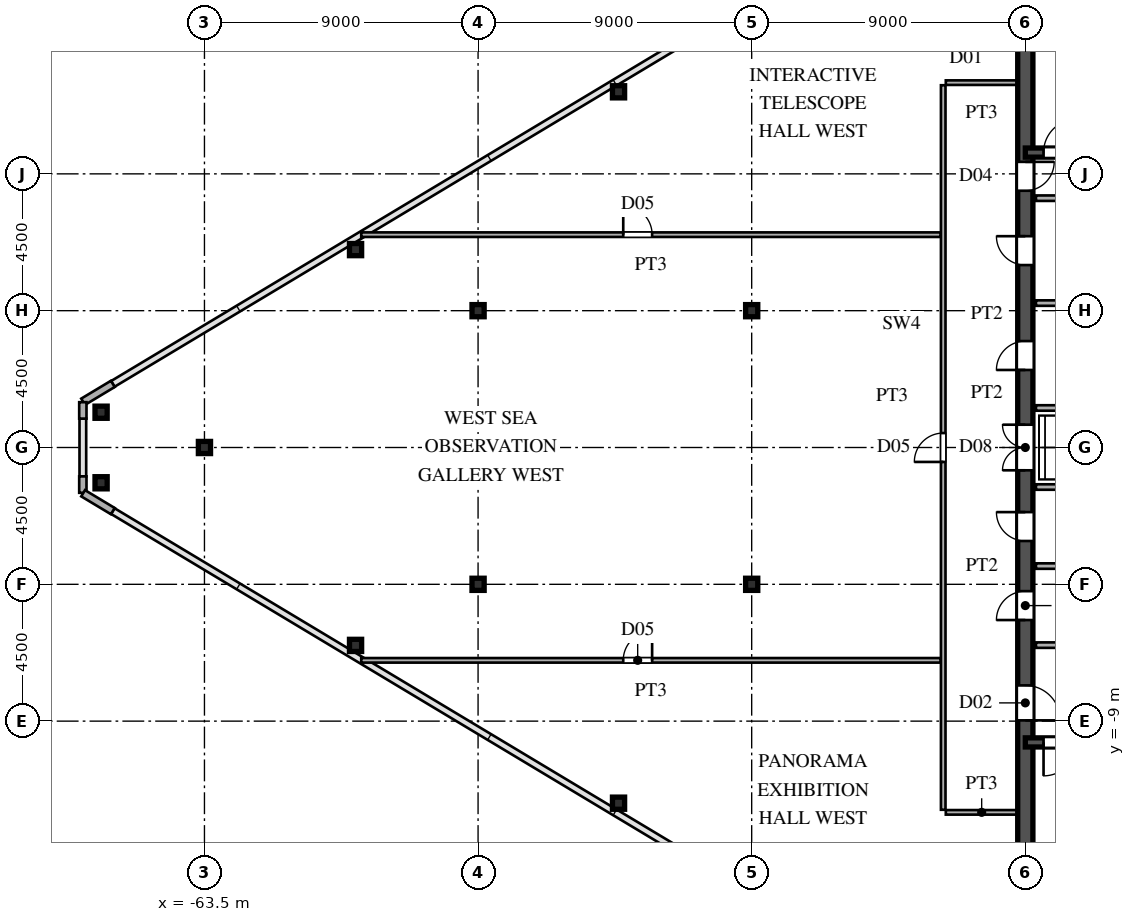
"""IFC4 building model, lengths in metres.
Left out: names, types, materials, properties, quantities, classifications, styles, units other than length and angle.
Written with IfcOpenShell. Run it as: python <this file> out.ifc"""

import sys

from ifc_helpers import new_model, si_unit, direction, frame, frame_2d, origin, origin_2d, place, context, subcontext, project, spatial, rectangle, hollow_rectangle, i_section, extrude, source, transform, mapped, element, fill, save


model = new_model("IFC4")
c1 = context("Model", 3, precision=1e-05, world=origin(), true_north=direction((0.0, 1.0)))
c2 = subcontext(c1, "Body", "Model", "MODEL_VIEW")
j1 = project(units=[si_unit("LENGTHUNIT", "METRE"), si_unit("PLANEANGLEUNIT", "RADIAN")], contexts=[c1])
p1 = place(None, origin())
s1 = spatial("IfcSite", under=j1, at=p1, CompositionType="ELEMENT")
p2 = place(p1, origin())
s2 = spatial("IfcBuilding", under=s1, at=p2, CompositionType="ELEMENT")
p3 = place(p2, frame((0.0, 0.0, 269.4)))
s3 = spatial("IfcBuildingStorey", under=s2, at=p3, CompositionType="ELEMENT", Elevation=269.4)
m1 = source(origin(), c2, "Body", "SweptSolid", [
    extrude(i_section(OverallWidth=0.4, OverallDepth=0.4, WebThickness=0.013, FlangeThickness=0.021, at=origin_2d()), origin(), (0.0, 0.0, 1.0), 4.8),
])
for number, where, z_axis, x_axis in (
    (1, (-45.5, -4.5, 0.0), (0.0, 0.0, 1.0), (1.0, 0.0, 0.0)),
    (2, (-45.5, 4.5, 0.0), (0.0, 0.0, 1.0), (1.0, 0.0, 0.0)),
    (3, (-54.5, -4.5, 0.0), (0.0, 0.0, 1.0), (1.0, 0.0, 0.0)),
    (4, (-54.5, 4.5, 0.0), (0.0, 0.0, 1.0), (1.0, 0.0, 0.0)),
    (5, (-63.5, 0.0, 0.0), (0.0, 0.0, 1.0), (1.0, 0.0, 0.0)),
):
    element("IfcColumn", number, at=place(p3, frame(where, z_axis=z_axis, x_axis=x_axis)), inside=s3, PredefinedType="COLUMN", context=c2, shape_type="MappedRepresentation", body=[
        mapped(m1, transform((0.0, 0.0, 0.0), scale=1.0)),
    ])
m2 = source(origin(), c2, "Body", "SweptSolid", [
    extrude(hollow_rectangle(XDim=0.4, YDim=0.4, WallThickness=0.016, at=origin_2d()), origin(), (0.0, 0.0, 1.0), 4.8),
])
for number, where, z_axis, x_axis in (
    (6, (-66.9, 1.16, 0.0), (0.0, 0.0, 1.0), (1.0, 0.0, 0.0)),
    (7, (-66.9, -1.16, 0.0), (0.0, 0.0, 1.0), (1.0, 0.0, 0.0)),
    (8, (-49.88, -11.699, 0.0), (0.0, 0.0, 1.0), (1.0, 0.0, 0.0)),
    (9, (-58.53, -6.509, 0.0), (0.0, 0.0, 1.0), (1.0, 0.0, 0.0)),
    (10, (-49.88, 11.699, 0.0), (0.0, 0.0, 1.0), (1.0, 0.0, 0.0)),
    (11, (-58.53, 6.509, 0.0), (0.0, 0.0, 1.0), (1.0, 0.0, 0.0)),
):
    element("IfcColumn", number, at=place(p3, frame(where, z_axis=z_axis, x_axis=x_axis)), inside=s3, PredefinedType="COLUMN", context=c2, shape_type="MappedRepresentation", body=[
        mapped(m2, transform((0.0, 0.0, 0.0), scale=1.0)),
    ])
p4 = place(p3, frame((-66.514, 2.092, 0.0), z_axis=(0.0, 0.0, 1.0), x_axis=(-0.85743623509, -0.514590228002, 0.0)))
e12 = element("IfcWall", 12, at=p4, inside=s3, PredefinedType="SOLIDWALL", context=c2, shape_type="SweptSolid", body=[
    extrude(rectangle(XDim=1.14, YDim=0.24, at=frame_2d((0.57, 0.0))), origin(), (0.0, 0.0, 1.0), 4.54),
])
for number, where, z_axis, x_axis in (
    (13, (-67.5, 1.49, 0.0), (0.0, 0.0, 1.0), (0.0, -1.0, 0.0)),
    (14, (-67.5, -0.95, 0.0), (0.0, 0.0, 1.0), (0.0, -1.0, 0.0)),
):
    element("IfcWall", number, at=place(p3, frame(where, z_axis=z_axis, x_axis=x_axis)), inside=s3, PredefinedType="SOLIDWALL", context=c2, shape_type="SweptSolid", body=[
        extrude(rectangle(XDim=0.54, YDim=0.24, at=frame_2d((0.27, 0.0))), origin(), (0.0, 0.0, 1.0), 4.54),
    ])
p5 = place(p3, frame((-67.491, -1.505, 0.0), z_axis=(0.0, 0.0, 1.0), x_axis=(0.85743623509, -0.514590228002, 0.0)))
e15 = element("IfcWall", 15, at=p5, inside=s3, PredefinedType="SOLIDWALL", context=c2, shape_type="SweptSolid", body=[
    extrude(rectangle(XDim=1.14, YDim=0.24, at=frame_2d((0.57, 0.0))), origin(), (0.0, 0.0, 1.0), 4.54),
])
p6 = place(p3, frame((-36.5, -13.65, 0.0), z_axis=(0.0, 0.0, 1.0), x_axis=(0.0, 1.0, 0.0)))
e16 = element("IfcWall", 16, at=p6, inside=s3, PredefinedType="SHEAR", context=c2, shape_type="SweptSolid", body=[
    extrude(rectangle(XDim=7.15, YDim=0.5, at=frame_2d((3.575, 0.0))), origin(), (0.0, 0.0, 1.0), 4.54),
])
p7 = place(p6, frame((4.675, 0.0, 0.0)))
e17 = element("IfcOpeningElement", 17, at=p7, cuts=e16, PredefinedType="OPENING", context=c2, shape_type="SweptSolid", body=[
    extrude(rectangle(XDim=1.15, YDim=2.2, at=frame_2d((0.575, 1.1))), frame((0.0, 0.26, 0.0), z_axis=(0.0, -1.0, 0.0), x_axis=(1.0, 0.0, 0.0)), (0.0, 0.0, 1.0), 0.52),
])
p8 = place(p3, frame((-36.5, -1.3, 0.0), z_axis=(0.0, 0.0, 1.0), x_axis=(0.0, 1.0, 0.0)))
e18 = element("IfcWall", 18, at=p8, inside=s3, PredefinedType="SHEAR", context=c2, shape_type="SweptSolid", body=[
    extrude(rectangle(XDim=2.6, YDim=0.5, at=frame_2d((1.3, 0.0))), origin(), (0.0, 0.0, 1.0), 4.54),
])
p9 = place(p8, frame((0.55, 0.0, 0.0)))
e19 = element("IfcOpeningElement", 19, at=p9, cuts=e18, PredefinedType="OPENING", context=c2, shape_type="SweptSolid", body=[
    extrude(rectangle(XDim=1.5, YDim=2.3, at=frame_2d((0.75, 1.15))), frame((0.0, 0.26, 0.0), z_axis=(0.0, -1.0, 0.0), x_axis=(1.0, 0.0, 0.0)), (0.0, 0.0, 1.0), 0.52),
])
p10 = place(p3, frame((-36.5, 8.2, 0.0), z_axis=(0.0, 0.0, 1.0), x_axis=(0.0, 1.0, 0.0)))
e20 = element("IfcWall", 20, at=p10, inside=s3, PredefinedType="SHEAR", context=c2, shape_type="SweptSolid", body=[
    extrude(rectangle(XDim=5.45, YDim=0.5, at=frame_2d((2.725, 0.0))), origin(), (0.0, 0.0, 1.0), 4.54),
])
p11 = place(p10, frame((0.245, 0.0, 0.0)))
e21 = element("IfcOpeningElement", 21, at=p11, cuts=e20, PredefinedType="OPENING", context=c2, shape_type="SweptSolid", body=[
    extrude(rectangle(XDim=0.95, YDim=2.15, at=frame_2d((0.475, 1.075))), frame((0.0, 0.26, 0.0), z_axis=(0.0, -1.0, 0.0), x_axis=(1.0, 0.0, 0.0)), (0.0, 0.0, 1.0), 0.52),
])
p12 = place(p3, frame((-36.5, -6.5, 0.0), z_axis=(0.0, 0.0, 1.0), x_axis=(0.0, 1.0, 0.0)))
e22 = element("IfcWall", 22, at=p12, inside=s3, PredefinedType="SHEAR", context=c2, shape_type="SweptSolid", body=[
    extrude(rectangle(XDim=2.6, YDim=0.5, at=frame_2d((1.3, 0.0))), origin(), (0.0, 0.0, 1.0), 4.54),
])
p13 = place(p12, frame((0.825, 0.0, 0.0)))
e23 = element("IfcOpeningElement", 23, at=p13, cuts=e22, PredefinedType="OPENING", context=c2, shape_type="SweptSolid", body=[
    extrude(rectangle(XDim=0.95, YDim=2.15, at=frame_2d((0.475, 1.075))), frame((0.0, 0.26, 0.0), z_axis=(0.0, -1.0, 0.0), x_axis=(1.0, 0.0, 0.0)), (0.0, 0.0, 1.0), 0.52),
])
p14 = place(p3, frame((-36.5, -3.9, 0.0), z_axis=(0.0, 0.0, 1.0), x_axis=(0.0, 1.0, 0.0)))
e24 = element("IfcWall", 24, at=p14, inside=s3, PredefinedType="SHEAR", context=c2, shape_type="SweptSolid", body=[
    extrude(rectangle(XDim=2.6, YDim=0.5, at=frame_2d((1.3, 0.0))), origin(), (0.0, 0.0, 1.0), 4.54),
])
p15 = place(p14, frame((0.825, 0.0, 0.0)))
e25 = element("IfcOpeningElement", 25, at=p15, cuts=e24, PredefinedType="OPENING", context=c2, shape_type="SweptSolid", body=[
    extrude(rectangle(XDim=0.95, YDim=2.15, at=frame_2d((0.475, 1.075))), frame((0.0, 0.26, 0.0), z_axis=(0.0, -1.0, 0.0), x_axis=(1.0, 0.0, 0.0)), (0.0, 0.0, 1.0), 0.52),
])
p16 = place(p3, frame((-36.5, 1.3, 0.0), z_axis=(0.0, 0.0, 1.0), x_axis=(0.0, 1.0, 0.0)))
e26 = element("IfcWall", 26, at=p16, inside=s3, PredefinedType="SHEAR", context=c2, shape_type="SweptSolid", body=[
    extrude(rectangle(XDim=3.45, YDim=0.5, at=frame_2d((1.725, 0.0))), origin(), (0.0, 0.0, 1.0), 4.54),
])
p17 = place(p16, frame((1.25, 0.0, 0.0)))
e27 = element("IfcOpeningElement", 27, at=p17, cuts=e26, PredefinedType="OPENING", context=c2, shape_type="SweptSolid", body=[
    extrude(rectangle(XDim=0.95, YDim=2.15, at=frame_2d((0.475, 1.075))), frame((0.0, 0.26, 0.0), z_axis=(0.0, -1.0, 0.0), x_axis=(1.0, 0.0, 0.0)), (0.0, 0.0, 1.0), 0.52),
])
p18 = place(p3, frame((-36.5, 4.75, 0.0), z_axis=(0.0, 0.0, 1.0), x_axis=(0.0, 1.0, 0.0)))
e28 = element("IfcWall", 28, at=p18, inside=s3, PredefinedType="SHEAR", context=c2, shape_type="SweptSolid", body=[
    extrude(rectangle(XDim=3.45, YDim=0.5, at=frame_2d((1.725, 0.0))), origin(), (0.0, 0.0, 1.0), 4.54),
])
p19 = place(p18, frame((1.25, 0.0, 0.0)))
e29 = element("IfcOpeningElement", 29, at=p19, cuts=e28, PredefinedType="OPENING", context=c2, shape_type="SweptSolid", body=[
    extrude(rectangle(XDim=0.95, YDim=2.15, at=frame_2d((0.475, 1.075))), frame((0.0, 0.26, 0.0), z_axis=(0.0, -1.0, 0.0), x_axis=(1.0, 0.0, 0.0)), (0.0, 0.0, 1.0), 0.52),
])
p20 = place(p3, frame((-36.5, -9.7, 0.0), z_axis=(0.0, 0.0, 1.0), x_axis=(1.0, 0.0, 0.0)))
e30 = element("IfcWall", 30, at=p20, inside=s3, PredefinedType="SHEAR", context=c2, shape_type="SweptSolid", body=[
    extrude(rectangle(XDim=9.0, YDim=0.3, at=frame_2d((4.5, 0.0))), origin(), (0.0, 0.0, 1.0), 4.54),
])
p21 = place(p20, frame((0.6, 0.0, 0.0)))
e31 = element("IfcOpeningElement", 31, at=p21, cuts=e30, PredefinedType="OPENING", context=c2, shape_type="SweptSolid", body=[
    extrude(rectangle(XDim=1.1, YDim=2.2, at=frame_2d((0.55, 1.1))), frame((0.0, 0.16, 0.0), z_axis=(0.0, -1.0, 0.0), x_axis=(1.0, 0.0, 0.0)), (0.0, 0.0, 1.0), 0.32),
])
p22 = place(p3, frame((-36.5, 9.7, 0.0), z_axis=(0.0, 0.0, 1.0), x_axis=(1.0, 0.0, 0.0)))
e32 = element("IfcWall", 32, at=p22, inside=s3, PredefinedType="SHEAR", context=c2, shape_type="SweptSolid", body=[
    extrude(rectangle(XDim=9.0, YDim=0.3, at=frame_2d((4.5, 0.0))), origin(), (0.0, 0.0, 1.0), 4.54),
])
p23 = place(p22, frame((0.6, 0.0, 0.0)))
e33 = element("IfcOpeningElement", 33, at=p23, cuts=e32, PredefinedType="OPENING", context=c2, shape_type="SweptSolid", body=[
    extrude(rectangle(XDim=1.1, YDim=2.2, at=frame_2d((0.55, 1.1))), frame((0.0, 0.16, 0.0), z_axis=(0.0, -1.0, 0.0), x_axis=(1.0, 0.0, 0.0)), (0.0, 0.0, 1.0), 0.32),
])
for number, where, z_axis, x_axis in (
    (34, (-36.15, -6.5, 0.0), (0.0, 0.0, 1.0), (1.0, 0.0, 0.0)),
    (35, (-36.15, 8.2, 0.0), (0.0, 0.0, 1.0), (1.0, 0.0, 0.0)),
):
    element("IfcWall", number, at=place(p3, frame(where, z_axis=z_axis, x_axis=x_axis)), inside=s3, PredefinedType="PARTITIONING", context=c2, shape_type="SweptSolid", body=[
        extrude(rectangle(XDim=5.7, YDim=0.18, at=frame_2d((2.85, 0.0))), origin(), (0.0, 0.0, 1.0), 4.54),
    ])
for number, where, z_axis, x_axis in (
    (36, (-36.15, -1.3, 0.0), (0.0, 0.0, 1.0), (1.0, 0.0, 0.0)),
    (37, (-36.15, 1.3, 0.0), (0.0, 0.0, 1.0), (1.0, 0.0, 0.0)),
    (38, (-36.15, -3.9, 0.0), (0.0, 0.0, 1.0), (1.0, 0.0, 0.0)),
    (39, (-36.15, 4.75, 0.0), (0.0, 0.0, 1.0), (1.0, 0.0, 0.0)),
):
    element("IfcWall", number, at=place(p3, frame(where, z_axis=z_axis, x_axis=x_axis)), inside=s3, PredefinedType="PARTITIONING", context=c2, shape_type="SweptSolid", body=[
        extrude(rectangle(XDim=2.95, YDim=0.18, at=frame_2d((1.475, 0.0))), origin(), (0.0, 0.0, 1.0), 4.54),
    ])
p24 = place(p3, frame((-39.115, -12.0, 0.0), z_axis=(0.0, 0.0, 1.0), x_axis=(1.0, 0.0, 0.0)))
e40 = element("IfcWall", 40, at=p24, inside=s3, PredefinedType="PARTITIONING", context=c2, shape_type="SweptSolid", body=[
    extrude(rectangle(XDim=2.36, YDim=0.15, at=frame_2d((1.18, 0.0))), origin(), (0.0, 0.0, 1.0), 4.54),
])
p25 = place(p3, frame((-58.343, -7.0, 0.0), z_axis=(0.0, 0.0, 1.0), x_axis=(1.0, 0.0, 0.0)))
e41 = element("IfcWall", 41, at=p25, inside=s3, PredefinedType="PARTITIONING", context=c2, shape_type="SweptSolid", body=[
    extrude(rectangle(XDim=19.058, YDim=0.15, at=frame_2d((9.529, 0.0))), origin(), (0.0, 0.0, 1.0), 4.54),
])
p26 = place(p25, frame((8.618, 0.0, 0.0)))
e42 = element("IfcOpeningElement", 42, at=p26, cuts=e41, PredefinedType="OPENING", context=c2, shape_type="SweptSolid", body=[
    extrude(rectangle(XDim=0.95, YDim=2.15, at=frame_2d((0.475, 1.075))), frame((0.0, 0.085, 0.0), z_axis=(0.0, -1.0, 0.0), x_axis=(1.0, 0.0, 0.0)), (0.0, 0.0, 1.0), 0.17),
])
p27 = place(p3, frame((-58.343, 7.0, 0.0), z_axis=(0.0, 0.0, 1.0), x_axis=(1.0, 0.0, 0.0)))
e43 = element("IfcWall", 43, at=p27, inside=s3, PredefinedType="PARTITIONING", context=c2, shape_type="SweptSolid", body=[
    extrude(rectangle(XDim=19.058, YDim=0.15, at=frame_2d((9.529, 0.0))), origin(), (0.0, 0.0, 1.0), 4.54),
])
p28 = place(p27, frame((8.618, 0.0, 0.0)))
e44 = element("IfcOpeningElement", 44, at=p28, cuts=e43, PredefinedType="OPENING", context=c2, shape_type="SweptSolid", body=[
    extrude(rectangle(XDim=0.95, YDim=2.15, at=frame_2d((0.475, 1.075))), frame((0.0, 0.085, 0.0), z_axis=(0.0, -1.0, 0.0), x_axis=(1.0, 0.0, 0.0)), (0.0, 0.0, 1.0), 0.17),
])
p29 = place(p3, frame((-39.115, 12.0, 0.0), z_axis=(0.0, 0.0, 1.0), x_axis=(1.0, 0.0, 0.0)))
e45 = element("IfcWall", 45, at=p29, inside=s3, PredefinedType="PARTITIONING", context=c2, shape_type="SweptSolid", body=[
    extrude(rectangle(XDim=2.36, YDim=0.15, at=frame_2d((1.18, 0.0))), origin(), (0.0, 0.0, 1.0), 4.54),
])
p30 = place(p3, frame((-39.2, -11.915, 0.0), z_axis=(0.0, 0.0, 1.0), x_axis=(0.0, 1.0, 0.0)))
e46 = element("IfcWall", 46, at=p30, inside=s3, PredefinedType="PARTITIONING", context=c2, shape_type="SweptSolid", body=[
    extrude(rectangle(XDim=23.83, YDim=0.15, at=frame_2d((11.915, 0.0))), origin(), (0.0, 0.0, 1.0), 4.54),
])
p31 = place(p30, frame((11.44, 0.0, 0.0)))
e47 = element("IfcOpeningElement", 47, at=p31, cuts=e46, PredefinedType="OPENING", context=c2, shape_type="SweptSolid", body=[
    extrude(rectangle(XDim=0.95, YDim=2.15, at=frame_2d((0.475, 1.075))), frame((0.0, 0.085, 0.0), z_axis=(0.0, -1.0, 0.0), x_axis=(1.0, 0.0, 0.0)), (0.0, 0.0, 1.0), 0.17),
])
m3 = source(origin(), c2, "Body", "SweptSolid", [
    extrude(rectangle(XDim=1.15, YDim=2.2, at=frame_2d((0.575, 1.1))), frame((0.0, 0.025, 0.0), z_axis=(0.0, -1.0, 0.0), x_axis=(1.0, 0.0, 0.0)), (0.0, 0.0, 1.0), 0.05),
])
p32 = place(p7, frame((1.15, 0.0, 0.0), z_axis=(0.0, 0.0, 1.0), x_axis=(-1.0, 0.0, 0.0)))
e48 = element("IfcDoor", 48, at=p32, inside=s3, OperationType="SINGLE_SWING_LEFT", PredefinedType="DOOR", context=c2, shape_type="MappedRepresentation", body=[
    mapped(m3, transform((0.0, 0.0, 0.0), scale=1.0)),
])
fill(e17, e48)
m4 = source(origin(), c2, "Body", "SweptSolid", [
    extrude(rectangle(XDim=1.5, YDim=2.3, at=frame_2d((0.75, 1.15))), frame((0.0, 0.025, 0.0), z_axis=(0.0, -1.0, 0.0), x_axis=(1.0, 0.0, 0.0)), (0.0, 0.0, 1.0), 0.05),
])
p33 = place(p9, origin())
e49 = element("IfcDoor", 49, at=p33, inside=s3, OperationType="DOUBLE_SWING_LEFT", PredefinedType="DOOR", context=c2, shape_type="MappedRepresentation", body=[
    mapped(m4, transform((0.0, 0.0, 0.0), scale=1.0)),
])
fill(e19, e49)
m5 = source(origin(), c2, "Body", "SweptSolid", [
    extrude(rectangle(XDim=0.95, YDim=2.15, at=frame_2d((0.475, 1.075))), frame((0.0, 0.025, 0.0), z_axis=(0.0, -1.0, 0.0), x_axis=(1.0, 0.0, 0.0)), (0.0, 0.0, 1.0), 0.05),
])
p34 = place(p11, frame((0.95, 0.0, 0.0), z_axis=(0.0, 0.0, 1.0), x_axis=(-1.0, 0.0, 0.0)))
e50 = element("IfcDoor", 50, at=p34, inside=s3, OperationType="SINGLE_SWING_RIGHT", PredefinedType="DOOR", context=c2, shape_type="MappedRepresentation", body=[
    mapped(m5, transform((0.0, 0.0, 0.0), scale=1.0)),
])
fill(e21, e50)
p35 = place(p13, origin())
e51 = element("IfcDoor", 51, at=p35, inside=s3, OperationType="SINGLE_SWING_LEFT", PredefinedType="DOOR", context=c2, shape_type="MappedRepresentation", body=[
    mapped(m5, transform((0.0, 0.0, 0.0), scale=1.0)),
])
fill(e23, e51)
p36 = place(p15, origin())
e52 = element("IfcDoor", 52, at=p36, inside=s3, OperationType="SINGLE_SWING_RIGHT", PredefinedType="DOOR", context=c2, shape_type="MappedRepresentation", body=[
    mapped(m5, transform((0.0, 0.0, 0.0), scale=1.0)),
])
fill(e25, e52)
p37 = place(p17, origin())
e53 = element("IfcDoor", 53, at=p37, inside=s3, OperationType="SINGLE_SWING_LEFT", PredefinedType="DOOR", context=c2, shape_type="MappedRepresentation", body=[
    mapped(m5, transform((0.0, 0.0, 0.0), scale=1.0)),
])
fill(e27, e53)
p38 = place(p19, origin())
e54 = element("IfcDoor", 54, at=p38, inside=s3, OperationType="SINGLE_SWING_RIGHT", PredefinedType="DOOR", context=c2, shape_type="MappedRepresentation", body=[
    mapped(m5, transform((0.0, 0.0, 0.0), scale=1.0)),
])
fill(e29, e54)
m6 = source(origin(), c2, "Body", "SweptSolid", [
    extrude(rectangle(XDim=1.1, YDim=2.2, at=frame_2d((0.55, 1.1))), frame((0.0, 0.025, 0.0), z_axis=(0.0, -1.0, 0.0), x_axis=(1.0, 0.0, 0.0)), (0.0, 0.0, 1.0), 0.05),
])
p39 = place(p21, frame((1.1, 0.0, 0.0), z_axis=(0.0, 0.0, 1.0), x_axis=(-1.0, 0.0, 0.0)))
e55 = element("IfcDoor", 55, at=p39, inside=s3, OperationType="SINGLE_SWING_LEFT", PredefinedType="DOOR", context=c2, shape_type="MappedRepresentation", body=[
    mapped(m6, transform((0.0, 0.0, 0.0), scale=1.0)),
])
fill(e31, e55)
p40 = place(p23, origin())
e56 = element("IfcDoor", 56, at=p40, inside=s3, OperationType="SINGLE_SWING_RIGHT", PredefinedType="DOOR", context=c2, shape_type="MappedRepresentation", body=[
    mapped(m6, transform((0.0, 0.0, 0.0), scale=1.0)),
])
fill(e33, e56)
m7 = source(origin(), c2, "Body", "SweptSolid", [
    extrude(rectangle(XDim=0.95, YDim=2.15, at=frame_2d((0.475, 1.075))), frame((0.0, 0.025, 0.0), z_axis=(0.0, -1.0, 0.0), x_axis=(1.0, 0.0, 0.0)), (0.0, 0.0, 1.0), 0.05),
])
p41 = place(p26, origin())
e57 = element("IfcDoor", 57, at=p41, inside=s3, OperationType="SINGLE_SWING_RIGHT", PredefinedType="DOOR", context=c2, shape_type="MappedRepresentation", body=[
    mapped(m7, transform((0.0, 0.0, 0.0), scale=1.0)),
])
fill(e42, e57)
p42 = place(p28, origin())
e58 = element("IfcDoor", 58, at=p42, inside=s3, OperationType="SINGLE_SWING_LEFT", PredefinedType="DOOR", context=c2, shape_type="MappedRepresentation", body=[
    mapped(m7, transform((0.0, 0.0, 0.0), scale=1.0)),
])
fill(e44, e58)
p43 = place(p31, origin())
e59 = element("IfcDoor", 59, at=p43, inside=s3, OperationType="SINGLE_SWING_LEFT", PredefinedType="DOOR", context=c2, shape_type="MappedRepresentation", body=[
    mapped(m7, transform((0.0, 0.0, 0.0), scale=1.0)),
])
fill(e47, e59)
save(model, sys.argv[1])
